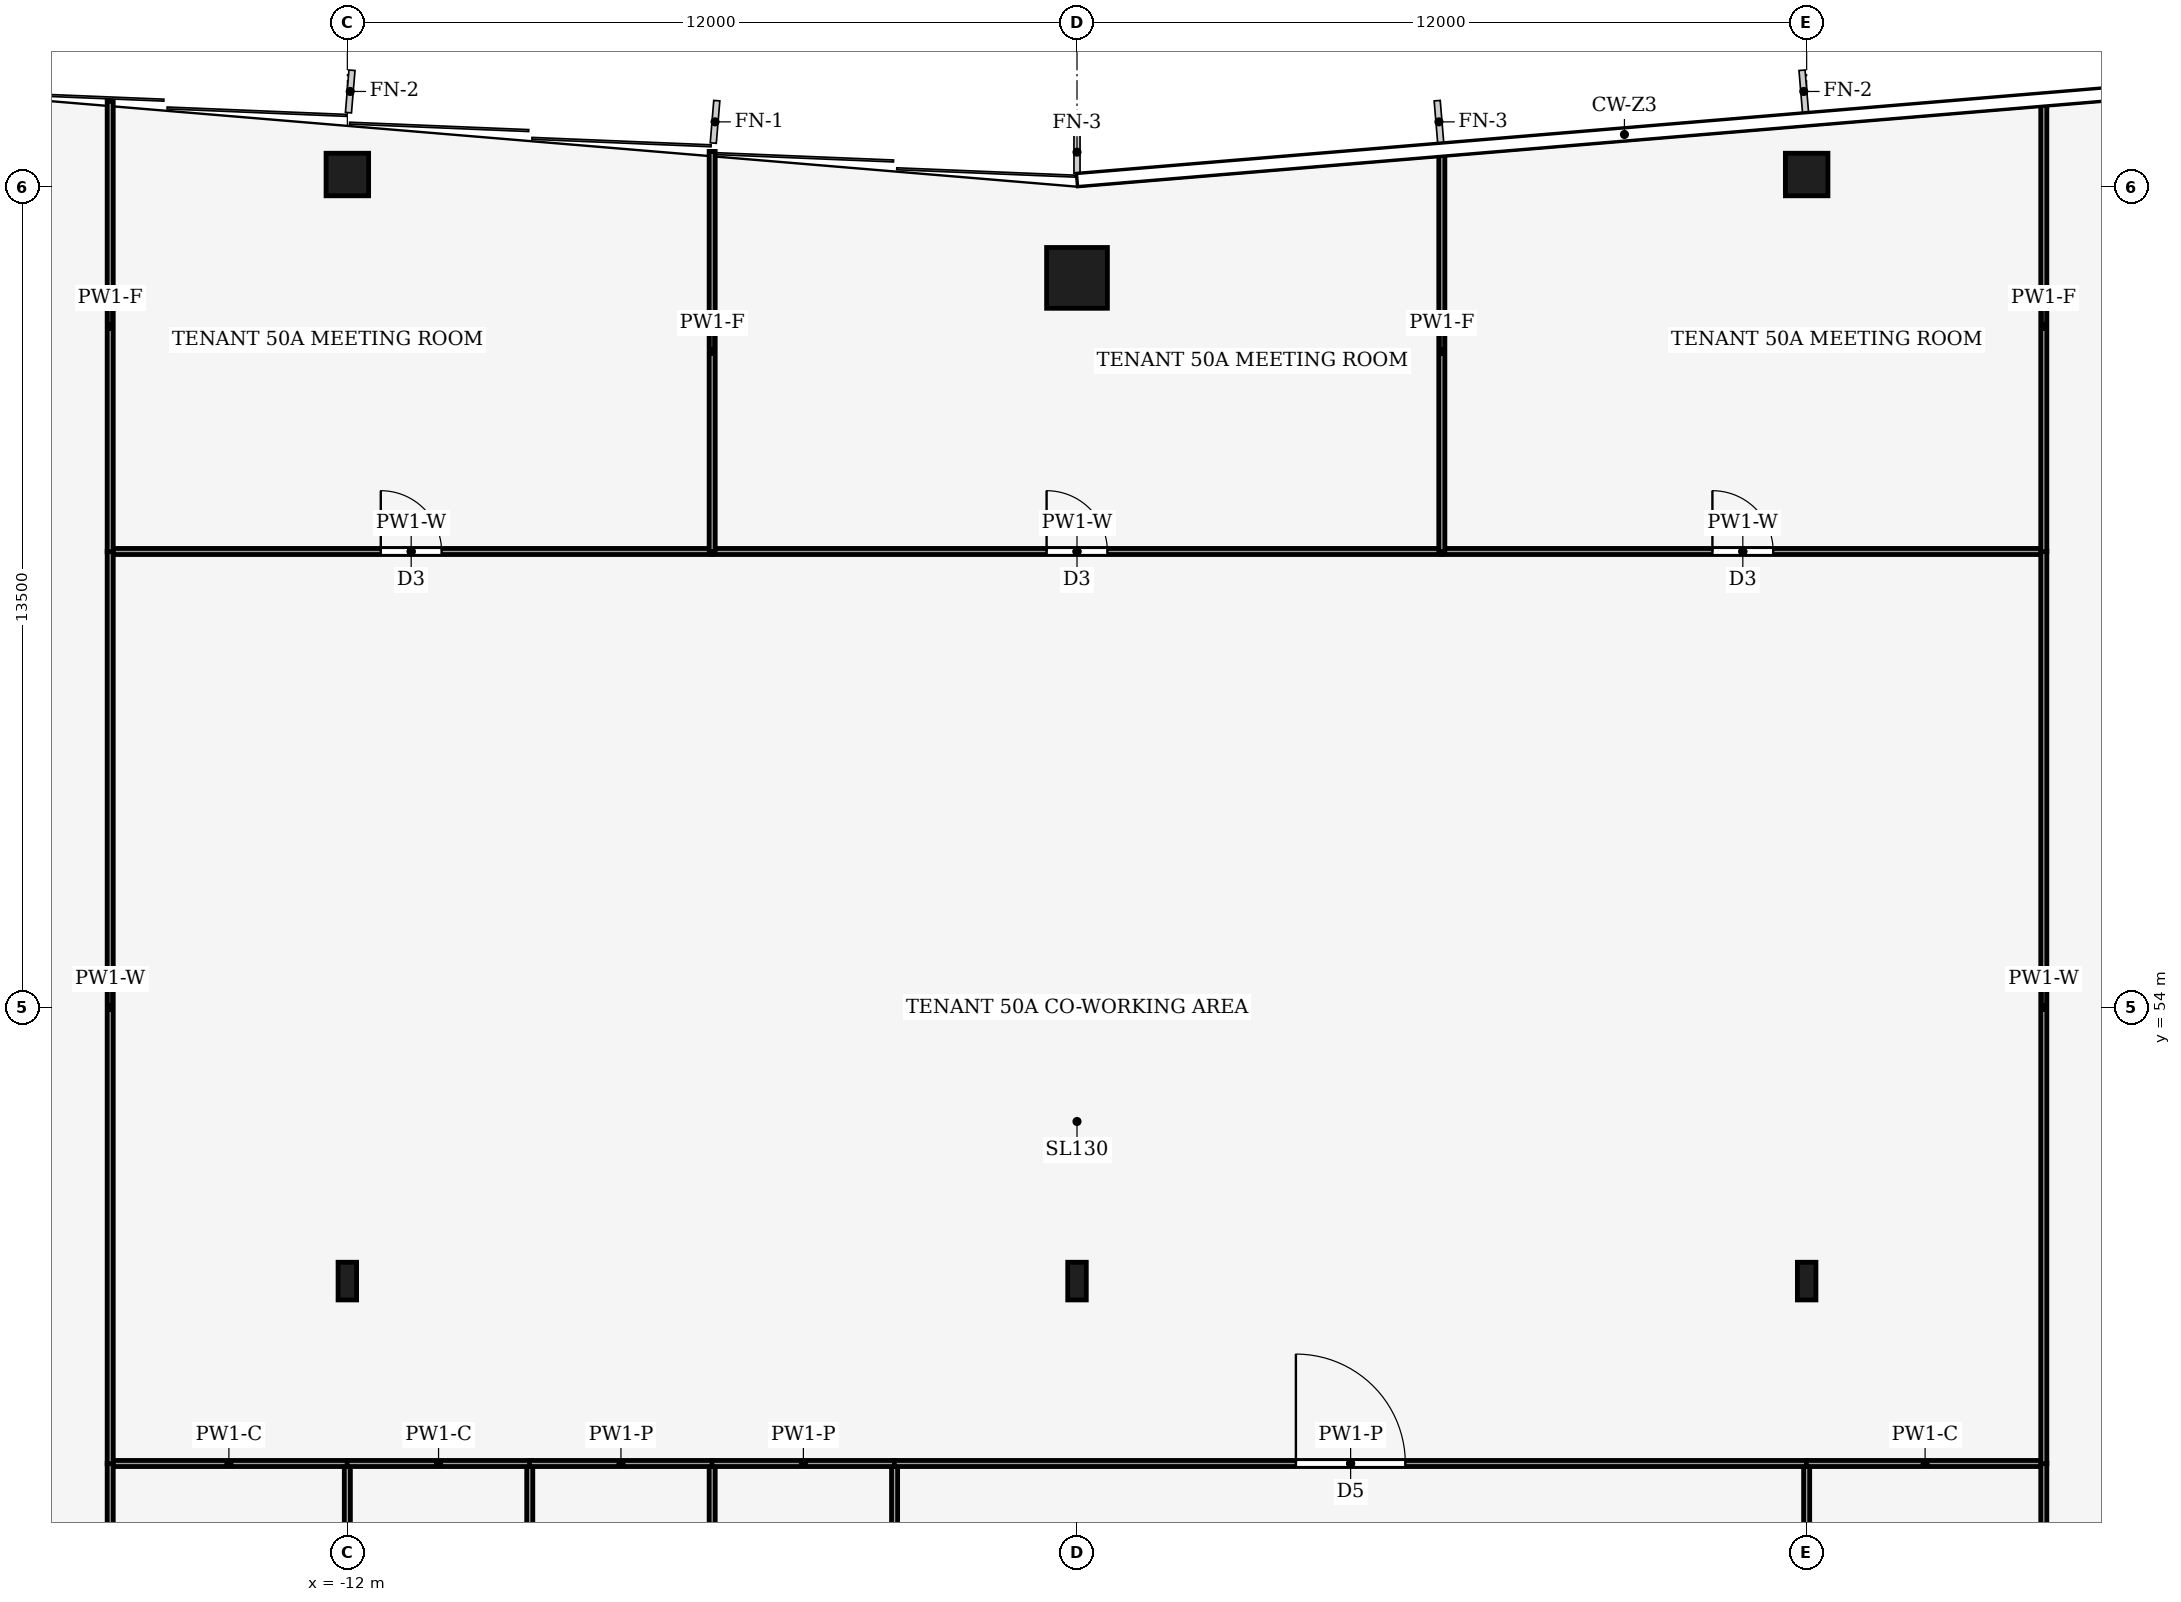
"""IFC4 building model, lengths in metres.
Left out: names, types, materials, properties, quantities, classifications, styles, units other than length and angle.
Written with IfcOpenShell. Run it as: python <this file> out.ifc"""

import sys

from ifc_helpers import new_model, si_unit, direction, frame, frame_2d, origin, origin_2d, place, context, subcontext, project, spatial, rectangle, hollow_rectangle, i_section, extrude, element, fill, save


model = new_model("IFC4")
c1 = context("Model", 3, precision=1e-05, world=origin(), true_north=direction((0.0, 1.0)))
c2 = subcontext(c1, "Body", "Model", "MODEL_VIEW")
j1 = project(units=[si_unit("LENGTHUNIT", "METRE"), si_unit("PLANEANGLEUNIT", "RADIAN")], contexts=[c1])
p1 = place(None, origin())
s1 = spatial("IfcSite", under=j1, at=p1, CompositionType="ELEMENT")
p2 = place(p1, origin())
s2 = spatial("IfcBuilding", under=s1, at=p2, CompositionType="ELEMENT")
p3 = place(p2, frame((0.0, 0.0, 218.0)))
s3 = spatial("IfcBuildingStorey", under=s2, at=p3, CompositionType="ELEMENT", Elevation=218.0)
p4 = place(p3, frame((0.0, 66.0, 0.0), z_axis=(0.0, 0.0, 1.0), x_axis=(1.0, 0.0, 0.0)))
e1 = element("IfcColumn", 1, at=p4, inside=s3, PredefinedType="COLUMN", context=c2, shape_type="SweptSolid", body=[
    extrude(hollow_rectangle(XDim=1.0, YDim=1.0, WallThickness=0.06, at=origin_2d()), origin(), (0.0, 0.0, 1.0), 4.0),
])
for number, where, z_axis, x_axis in (
    (2, (-12.0, 67.7, 0.0), (0.0, 0.0, 1.0), (1.0, 0.0, 0.0)),
    (3, (12.0, 67.7, 0.0), (0.0, 0.0, 1.0), (1.0, 0.0, 0.0)),
):
    element("IfcColumn", number, at=place(p3, frame(where, z_axis=z_axis, x_axis=x_axis)), inside=s3, PredefinedType="COLUMN", context=c2, shape_type="SweptSolid", body=[
        extrude(hollow_rectangle(XDim=0.7, YDim=0.7, WallThickness=0.03, at=origin_2d()), origin(), (0.0, 0.0, 1.0), 4.0),
    ])
for number, where, z_axis, x_axis in (
    (4, (-12.0, 49.5, 0.0), (0.0, 0.0, 1.0), (1.0, 0.0, 0.0)),
    (5, (0.0, 49.5, 0.0), (0.0, 0.0, 1.0), (1.0, 0.0, 0.0)),
    (6, (12.0, 49.5, 0.0), (0.0, 0.0, 1.0), (1.0, 0.0, 0.0)),
):
    element("IfcColumn", number, at=place(p3, frame(where, z_axis=z_axis, x_axis=x_axis)), inside=s3, PredefinedType="COLUMN", context=c2, shape_type="SweptSolid", body=[
        extrude(i_section(OverallWidth=0.305, OverallDepth=0.62, WebThickness=0.021, FlangeThickness=0.04, FilletRadius=0.027, at=origin_2d()), origin(), (0.0, 0.0, 1.0), 4.0),
    ])
p5 = place(p3, frame((-12.0, 46.5, 0.0), z_axis=(0.0, 0.0, 1.0), x_axis=(0.0, -1.0, 0.0)))
e7 = element("IfcWall", 7, at=p5, inside=s3, PredefinedType="PARTITIONING", context=c2, shape_type="SweptSolid", body=[
    extrude(rectangle(XDim=5.6, YDim=0.1, at=frame_2d((2.8, 0.0))), origin(), (0.0, 0.0, 1.0), 3.44),
])
p6 = place(p5, frame((2.3, 0.0, 0.0)))
e8 = element("IfcOpeningElement", 8, at=p6, cuts=e7, PredefinedType="OPENING", context=c2, shape_type="SweptSolid", body=[
    extrude(rectangle(XDim=1.0, YDim=2.1, at=frame_2d((0.5, 1.05))), frame((0.0, 0.06, 0.0), z_axis=(0.0, -1.0, 0.0), x_axis=(1.0, 0.0, 0.0)), (0.0, 0.0, 1.0), 0.12),
])
p7 = place(p3, frame((-11.996, 46.5, 0.0), z_axis=(0.0, 0.0, 1.0), x_axis=(-1.0, 0.0, 0.0)))
e9 = element("IfcWall", 9, at=p7, inside=s3, PredefinedType="PARTITIONING", context=c2, shape_type="SweptSolid", body=[
    extrude(rectangle(XDim=3.904, YDim=0.1, at=frame_2d((1.952, 0.0))), origin(), (0.0, 0.0, 1.0), 3.87),
])
p8 = place(p3, frame((-15.9, 46.504, 0.0), z_axis=(0.0, 0.0, 1.0), x_axis=(0.0, -1.0, 0.0)))
e10 = element("IfcWall", 10, at=p8, inside=s3, PredefinedType="PARTITIONING", context=c2, shape_type="SweptSolid", body=[
    extrude(rectangle(XDim=5.608, YDim=0.1, at=frame_2d((2.804, 0.0))), origin(), (0.0, 0.0, 1.0), 3.44),
])
p9 = place(p3, frame((-9.0, 46.5, 0.0), z_axis=(0.0, 0.0, 1.0), x_axis=(0.0, -1.0, 0.0)))
e11 = element("IfcWall", 11, at=p9, inside=s3, PredefinedType="PARTITIONING", context=c2, shape_type="SweptSolid", body=[
    extrude(rectangle(XDim=5.6, YDim=0.1, at=frame_2d((2.8, 0.0))), origin(), (0.0, 0.0, 1.0), 3.87),
])
p10 = place(p9, frame((2.3, 0.0, 0.0)))
e12 = element("IfcOpeningElement", 12, at=p10, cuts=e11, PredefinedType="OPENING", context=c2, shape_type="SweptSolid", body=[
    extrude(rectangle(XDim=1.0, YDim=2.1, at=frame_2d((0.5, 1.05))), frame((0.0, 0.06, 0.0), z_axis=(0.0, -1.0, 0.0), x_axis=(1.0, 0.0, 0.0)), (0.0, 0.0, 1.0), 0.12),
])
p11 = place(p3, frame((-8.996, 46.5, 0.0), z_axis=(0.0, 0.0, 1.0), x_axis=(-1.0, 0.0, 0.0)))
e13 = element("IfcWall", 13, at=p11, inside=s3, PredefinedType="PARTITIONING", context=c2, shape_type="SweptSolid", body=[
    extrude(rectangle(XDim=3.008, YDim=0.1, at=frame_2d((1.504, 0.0))), origin(), (0.0, 0.0, 1.0), 3.87),
])
p12 = place(p3, frame((-6.0, 40.9, 0.0), z_axis=(0.0, 0.0, 1.0), x_axis=(0.0, 1.0, 0.0)))
e14 = element("IfcWall", 14, at=p12, inside=s3, PredefinedType="PARTITIONING", context=c2, shape_type="SweptSolid", body=[
    extrude(rectangle(XDim=5.6, YDim=0.1, at=frame_2d((2.8, 0.0))), origin(), (0.0, 0.0, 1.0), 3.87),
])
p13 = place(p3, frame((-5.996, 46.5, 0.0), z_axis=(0.0, 0.0, 1.0), x_axis=(-1.0, 0.0, 0.0)))
e15 = element("IfcWall", 15, at=p13, inside=s3, PredefinedType="PARTITIONING", context=c2, shape_type="SweptSolid", body=[
    extrude(rectangle(XDim=3.008, YDim=0.1, at=frame_2d((1.504, 0.0))), origin(), (0.0, 0.0, 1.0), 3.44),
])
p14 = place(p3, frame((-3.0, 40.9, 0.0), z_axis=(0.0, 0.0, 1.0), x_axis=(0.0, 1.0, 0.0)))
e16 = element("IfcWall", 16, at=p14, inside=s3, PredefinedType="PARTITIONING", context=c2, shape_type="SweptSolid", body=[
    extrude(rectangle(XDim=5.6, YDim=0.1, at=frame_2d((2.8, 0.0))), origin(), (0.0, 0.0, 1.0), 3.87),
])
p15 = place(p14, frame((2.3, 0.0, 0.0)))
e17 = element("IfcOpeningElement", 17, at=p15, cuts=e16, PredefinedType="OPENING", context=c2, shape_type="SweptSolid", body=[
    extrude(rectangle(XDim=1.0, YDim=2.1, at=frame_2d((0.5, 1.05))), frame((0.0, 0.06, 0.0), z_axis=(0.0, -1.0, 0.0), x_axis=(1.0, 0.0, 0.0)), (0.0, 0.0, 1.0), 0.12),
])
p16 = place(p3, frame((-2.996, 46.5, 0.0), z_axis=(0.0, 0.0, 1.0), x_axis=(-1.0, 0.0, 0.0)))
e18 = element("IfcWall", 18, at=p16, inside=s3, PredefinedType="PARTITIONING", context=c2, shape_type="SweptSolid", body=[
    extrude(rectangle(XDim=3.008, YDim=0.1, at=frame_2d((1.504, 0.0))), origin(), (0.0, 0.0, 1.0), 3.44),
])
p17 = place(p3, frame((12.0, 40.9, 0.0), z_axis=(0.0, 0.0, 1.0), x_axis=(0.0, 1.0, 0.0)))
e19 = element("IfcWall", 19, at=p17, inside=s3, PredefinedType="PARTITIONING", context=c2, shape_type="SweptSolid", body=[
    extrude(rectangle(XDim=5.6, YDim=0.1, at=frame_2d((2.8, 0.0))), origin(), (0.0, 0.0, 1.0), 3.44),
])
p18 = place(p3, frame((-3.004, 46.5, 0.0), z_axis=(0.0, 0.0, 1.0), x_axis=(1.0, 0.0, 0.0)))
e20 = element("IfcWall", 20, at=p18, inside=s3, PredefinedType="PARTITIONING", context=c2, shape_type="SweptSolid", body=[
    extrude(rectangle(XDim=15.008, YDim=0.1, at=frame_2d((7.504, 0.0))), origin(), (0.0, 0.0, 1.0), 3.44),
])
p19 = place(p18, frame((6.604, 0.0, 0.0)))
e21 = element("IfcOpeningElement", 21, at=p19, cuts=e20, PredefinedType="OPENING", context=c2, shape_type="SweptSolid", body=[
    extrude(rectangle(XDim=1.8, YDim=2.1, at=frame_2d((0.9, 1.05))), frame((0.0, 0.06, 0.0), z_axis=(0.0, -1.0, 0.0), x_axis=(1.0, 0.0, 0.0)), (0.0, 0.0, 1.0), 0.12),
])
p20 = place(p3, frame((15.9, 46.5, 0.0), z_axis=(0.0, 0.0, 1.0), x_axis=(-1.0, 0.0, 0.0)))
e22 = element("IfcWall", 22, at=p20, inside=s3, PredefinedType="PARTITIONING", context=c2, shape_type="SweptSolid", body=[
    extrude(rectangle(XDim=3.904, YDim=0.1, at=frame_2d((1.952, 0.0))), origin(), (0.0, 0.0, 1.0), 3.87),
])
p21 = place(p3, frame((15.9, 40.896, 0.0), z_axis=(0.0, 0.0, 1.0), x_axis=(0.0, 1.0, 0.0)))
e23 = element("IfcWall", 23, at=p21, inside=s3, PredefinedType="PARTITIONING", context=c2, shape_type="SweptSolid", body=[
    extrude(rectangle(XDim=5.608, YDim=0.1, at=frame_2d((2.804, 0.0))), origin(), (0.0, 0.0, 1.0), 3.44),
])
p22 = place(p3, frame((-15.9, 61.5, 0.0), z_axis=(0.0, 0.0, 1.0), x_axis=(1.0, 0.0, 0.0)))
e24 = element("IfcWall", 24, at=p22, inside=s3, PredefinedType="PARTITIONING", context=c2, shape_type="SweptSolid", body=[
    extrude(rectangle(XDim=9.9, YDim=0.1, at=frame_2d((4.95, 0.0))), origin(), (0.0, 0.0, 1.0), 3.24),
])
p23 = place(p22, frame((4.45, 0.0, 0.0)))
e25 = element("IfcOpeningElement", 25, at=p23, cuts=e24, PredefinedType="OPENING", context=c2, shape_type="SweptSolid", body=[
    extrude(rectangle(XDim=1.0, YDim=2.1, at=frame_2d((0.5, 1.05))), frame((0.0, 0.06, 0.0), z_axis=(0.0, -1.0, 0.0), x_axis=(1.0, 0.0, 0.0)), (0.0, 0.0, 1.0), 0.12),
])
p24 = place(p3, frame((-6.0, 61.5, 0.0), z_axis=(0.0, 0.0, 1.0), x_axis=(1.0, 0.0, 0.0)))
e26 = element("IfcWall", 26, at=p24, inside=s3, PredefinedType="PARTITIONING", context=c2, shape_type="SweptSolid", body=[
    extrude(rectangle(XDim=12.0, YDim=0.1, at=frame_2d((6.0, 0.0))), origin(), (0.0, 0.0, 1.0), 3.24),
])
p25 = place(p24, frame((5.5, 0.0, 0.0)))
e27 = element("IfcOpeningElement", 27, at=p25, cuts=e26, PredefinedType="OPENING", context=c2, shape_type="SweptSolid", body=[
    extrude(rectangle(XDim=1.0, YDim=2.1, at=frame_2d((0.5, 1.05))), frame((0.0, 0.06, 0.0), z_axis=(0.0, -1.0, 0.0), x_axis=(1.0, 0.0, 0.0)), (0.0, 0.0, 1.0), 0.12),
])
p26 = place(p3, frame((6.0, 61.5, 0.0), z_axis=(0.0, 0.0, 1.0), x_axis=(1.0, 0.0, 0.0)))
e28 = element("IfcWall", 28, at=p26, inside=s3, PredefinedType="PARTITIONING", context=c2, shape_type="SweptSolid", body=[
    extrude(rectangle(XDim=9.9, YDim=0.1, at=frame_2d((4.95, 0.0))), origin(), (0.0, 0.0, 1.0), 3.24),
])
p27 = place(p26, frame((4.45, 0.0, 0.0)))
e29 = element("IfcOpeningElement", 29, at=p27, cuts=e28, PredefinedType="OPENING", context=c2, shape_type="SweptSolid", body=[
    extrude(rectangle(XDim=1.0, YDim=2.1, at=frame_2d((0.5, 1.05))), frame((0.0, 0.06, 0.0), z_axis=(0.0, -1.0, 0.0), x_axis=(1.0, 0.0, 0.0)), (0.0, 0.0, 1.0), 0.12),
])
for number, where, z_axis, x_axis in (
    (30, (-15.9, 61.504, 0.0), (0.0, 0.0, 1.0), (0.0, -1.0, 0.0)),
    (31, (15.9, 46.496, 0.0), (0.0, 0.0, 1.0), (0.0, 1.0, 0.0)),
):
    element("IfcWall", number, at=place(p3, frame(where, z_axis=z_axis, x_axis=x_axis)), inside=s3, PredefinedType="PARTITIONING", context=c2, shape_type="SweptSolid", body=[
        extrude(rectangle(XDim=15.008, YDim=0.1, at=frame_2d((7.504, 0.0))), origin(), (0.0, 0.0, 1.0), 3.24),
    ])
p28 = place(p3, frame((-6.0, 61.5, 0.0), z_axis=(0.0, 0.0, 1.0), x_axis=(0.0, 1.0, 0.0)))
e32 = element("IfcWall", 32, at=p28, inside=s3, PredefinedType="PARTITIONING", context=c2, shape_type="SweptSolid", body=[
    extrude(rectangle(XDim=6.58, YDim=0.1, at=frame_2d((3.29, 0.0))), origin(), (0.0, 0.0, 1.0), 3.04),
])
p29 = place(p3, frame((-15.9, 68.905, 0.0), z_axis=(0.0, 0.0, 1.0), x_axis=(0.0, -1.0, 0.0)))
e33 = element("IfcWall", 33, at=p29, inside=s3, PredefinedType="PARTITIONING", context=c2, shape_type="SweptSolid", body=[
    extrude(rectangle(XDim=7.409, YDim=0.1, at=frame_2d((3.705, 0.0))), origin(), (0.0, 0.0, 1.0), 3.04),
])
p30 = place(p3, frame((6.0, 61.5, 0.0), z_axis=(0.0, 0.0, 1.0), x_axis=(0.0, 1.0, 0.0)))
e34 = element("IfcWall", 34, at=p30, inside=s3, PredefinedType="PARTITIONING", context=c2, shape_type="SweptSolid", body=[
    extrude(rectangle(XDim=6.58, YDim=0.1, at=frame_2d((3.29, 0.0))), origin(), (0.0, 0.0, 1.0), 3.04),
])
p31 = place(p3, frame((15.9, 61.496, 0.0), z_axis=(0.0, 0.0, 1.0), x_axis=(0.0, 1.0, 0.0)))
e35 = element("IfcWall", 35, at=p31, inside=s3, PredefinedType="PARTITIONING", context=c2, shape_type="SweptSolid", body=[
    extrude(rectangle(XDim=7.409, YDim=0.1, at=frame_2d((3.705, 0.0))), origin(), (0.0, 0.0, 1.0), 3.04),
])
p32 = place(p19, origin())
e36 = element("IfcDoor", 36, at=p32, inside=s3, OperationType="DOUBLE_DOOR_SINGLE_SWING", PredefinedType="DOOR", context=c2, shape_type="SweptSolid", body=[
    extrude(rectangle(XDim=1.8, YDim=2.1, at=frame_2d((0.9, 1.05))), frame((0.0, 0.025, 0.0), z_axis=(0.0, -1.0, 0.0), x_axis=(1.0, 0.0, 0.0)), (0.0, 0.0, 1.0), 0.05),
])
fill(e21, e36)
p33 = place(p23, origin())
e37 = element("IfcDoor", 37, at=p33, inside=s3, OperationType="SINGLE_SWING_LEFT", PredefinedType="DOOR", context=c2, shape_type="SweptSolid", body=[
    extrude(rectangle(XDim=1.0, YDim=2.1, at=frame_2d((0.5, 1.05))), frame((0.0, 0.025, 0.0), z_axis=(0.0, -1.0, 0.0), x_axis=(1.0, 0.0, 0.0)), (0.0, 0.0, 1.0), 0.05),
])
fill(e25, e37)
p34 = place(p25, origin())
e38 = element("IfcDoor", 38, at=p34, inside=s3, OperationType="SINGLE_SWING_RIGHT", PredefinedType="DOOR", context=c2, shape_type="SweptSolid", body=[
    extrude(rectangle(XDim=1.0, YDim=2.1, at=frame_2d((0.5, 1.05))), frame((0.0, 0.025, 0.0), z_axis=(0.0, -1.0, 0.0), x_axis=(1.0, 0.0, 0.0)), (0.0, 0.0, 1.0), 0.05),
])
fill(e27, e38)
p35 = place(p27, origin())
e39 = element("IfcDoor", 39, at=p35, inside=s3, OperationType="SINGLE_SWING_LEFT", PredefinedType="DOOR", context=c2, shape_type="SweptSolid", body=[
    extrude(rectangle(XDim=1.0, YDim=2.1, at=frame_2d((0.5, 1.05))), frame((0.0, 0.025, 0.0), z_axis=(0.0, -1.0, 0.0), x_axis=(1.0, 0.0, 0.0)), (0.0, 0.0, 1.0), 0.05),
])
fill(e29, e39)
save(model, sys.argv[1])
